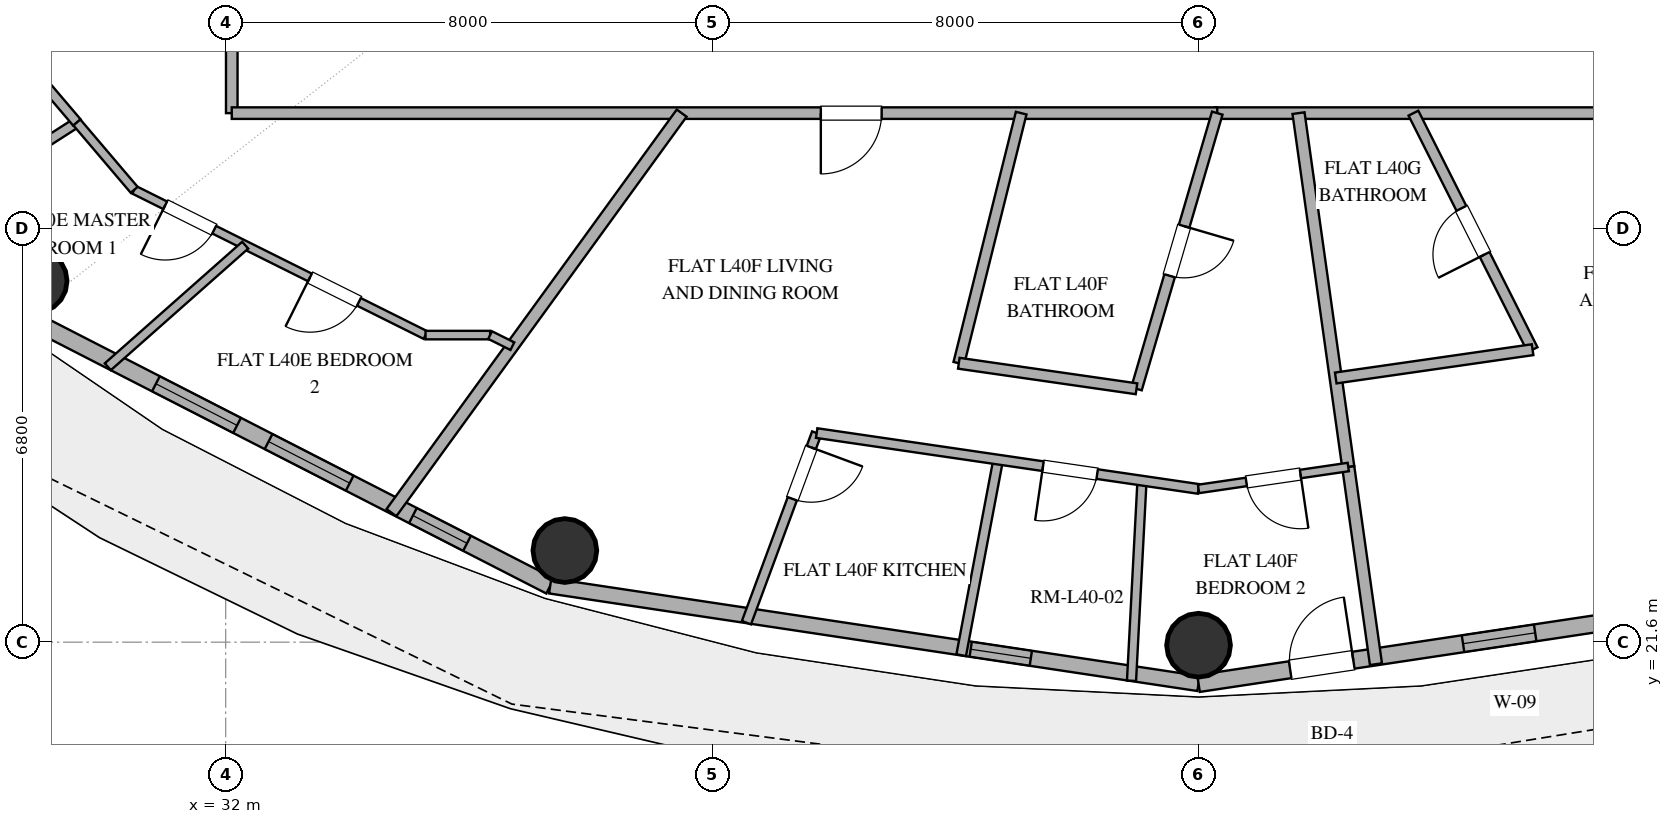
"""IFC4 building model, lengths in metres.
Left out: names, types, materials, properties, quantities, classifications, styles, units other than length and angle.
Written with IfcOpenShell. Run it as: python <this file> out.ifc"""

import sys

from ifc_helpers import new_model, si_unit, direction, frame, frame_2d, origin, origin_2d, place, context, subcontext, project, spatial, rectangle, hollow_circle, extrude, element, fill, save


model = new_model("IFC4")
c1 = context("Model", 3, precision=1e-05, world=origin(), true_north=direction((0.0, 1.0)))
c2 = subcontext(c1, "Body", "Model", "MODEL_VIEW")
j1 = project(units=[si_unit("LENGTHUNIT", "METRE"), si_unit("PLANEANGLEUNIT", "RADIAN")], contexts=[c1])
p1 = place(None, origin())
s1 = spatial("IfcSite", under=j1, at=p1, CompositionType="ELEMENT")
p2 = place(p1, origin())
s2 = spatial("IfcBuilding", under=s1, at=p2, CompositionType="ELEMENT")
p3 = place(p2, frame((0.0, 0.0, 161.4)))
s3 = spatial("IfcBuildingStorey", under=s2, at=p3, CompositionType="ELEMENT", Elevation=161.4)
for number, where, z_axis, x_axis in (
    (1, (28.866, 27.54, 0.0), (0.0, 0.0, 1.0), (1.0, 0.0, 0.0)),
    (2, (37.578, 23.107, 0.0), (0.0, 0.0, 1.0), (1.0, 0.0, 0.0)),
    (3, (48.0, 21.55, 0.0), (0.0, 0.0, 1.0), (1.0, 0.0, 0.0)),
):
    element("IfcColumn", number, at=place(p3, frame(where, z_axis=z_axis, x_axis=x_axis)), inside=s3, PredefinedType="COLUMN", context=c2, shape_type="SweptSolid", body=[
        extrude(hollow_circle(Radius=0.525, WallThickness=0.028, at=origin_2d()), origin(), (0.0, 0.0, 1.0), 3.38),
    ])
p4 = place(p3, frame((28.424, 27.094, 0.0), z_axis=(0.0, 0.0, 1.0), x_axis=(0.889872523182, -0.456209263919, 0.0)))
e4 = element("IfcWall", 4, at=p4, inside=s3, PredefinedType="SOLIDWALL", context=c2, shape_type="SweptSolid", body=[
    extrude(rectangle(XDim=10.016, YDim=0.28, at=frame_2d((5.008, 0.0))), origin(), (0.0, 0.0, 1.0), 3.38),
])
p5 = place(p4, frame((2.729, 0.0, 0.85)))
e5 = element("IfcOpeningElement", 5, at=p5, cuts=e4, PredefinedType="OPENING", context=c2, shape_type="SweptSolid", body=[
    extrude(rectangle(XDim=1.5, YDim=2.0, at=frame_2d((0.75, 1.0))), frame((0.0, 0.15, 0.0), z_axis=(0.0, -1.0, 0.0), x_axis=(1.0, 0.0, 0.0)), (0.0, 0.0, 1.0), 0.3),
])
p6 = place(p4, frame((4.811, 0.0, 0.85)))
e6 = element("IfcOpeningElement", 6, at=p6, cuts=e4, PredefinedType="OPENING", context=c2, shape_type="SweptSolid", body=[
    extrude(rectangle(XDim=1.5, YDim=2.0, at=frame_2d((0.75, 1.0))), frame((0.0, 0.15, 0.0), z_axis=(0.0, -1.0, 0.0), x_axis=(1.0, 0.0, 0.0)), (0.0, 0.0, 1.0), 0.3),
])
p7 = place(p4, frame((7.479, 0.0, 0.85)))
e7 = element("IfcOpeningElement", 7, at=p7, cuts=e4, PredefinedType="OPENING", context=c2, shape_type="SweptSolid", body=[
    extrude(rectangle(XDim=1.0, YDim=1.8, at=frame_2d((0.5, 0.9))), frame((0.0, 0.15, 0.0), z_axis=(0.0, -1.0, 0.0), x_axis=(1.0, 0.0, 0.0)), (0.0, 0.0, 1.0), 0.3),
])
p8 = place(p3, frame((37.337, 22.525, 0.0), z_axis=(0.0, 0.0, 1.0), x_axis=(0.988863993413, -0.148822049884, 0.0)))
e8 = element("IfcWall", 8, at=p8, inside=s3, PredefinedType="SOLIDWALL", context=c2, shape_type="SweptSolid", body=[
    extrude(rectangle(XDim=10.783, YDim=0.25, at=frame_2d((5.392, 0.0))), origin(), (0.0, 0.0, 1.0), 3.38),
])
p9 = place(p8, frame((6.993, 0.0, 0.35)))
e9 = element("IfcOpeningElement", 9, at=p9, cuts=e8, PredefinedType="OPENING", context=c2, shape_type="SweptSolid", body=[
    extrude(rectangle(XDim=1.0, YDim=1.05, at=frame_2d((0.5, 0.525))), frame((0.0, 0.135, 0.0), z_axis=(0.0, -1.0, 0.0), x_axis=(1.0, 0.0, 0.0)), (0.0, 0.0, 1.0), 0.27),
])
p10 = place(p3, frame((48.0, 20.92, 0.0), z_axis=(0.0, 0.0, 1.0), x_axis=(0.988863993413, 0.148822049884, 0.0)))
e10 = element("IfcWall", 10, at=p10, inside=s3, PredefinedType="SOLIDWALL", context=c2, shape_type="SweptSolid", body=[
    extrude(rectangle(XDim=10.783, YDim=0.28, at=frame_2d((5.392, 0.0))), origin(), (0.0, 0.0, 1.0), 3.38),
])
p11 = place(p10, frame((1.524, 0.0, 0.0)))
e11 = element("IfcOpeningElement", 11, at=p11, cuts=e10, PredefinedType="OPENING", context=c2, shape_type="SweptSolid", body=[
    extrude(rectangle(XDim=1.05, YDim=2.2, at=frame_2d((0.525, 1.1))), frame((0.0, 0.15, 0.0), z_axis=(0.0, -1.0, 0.0), x_axis=(1.0, 0.0, 0.0)), (0.0, 0.0, 1.0), 0.3),
])
p12 = place(p10, frame((4.399, 0.0, 0.85)))
e12 = element("IfcOpeningElement", 12, at=p12, cuts=e10, PredefinedType="OPENING", context=c2, shape_type="SweptSolid", body=[
    extrude(rectangle(XDim=1.2, YDim=1.8, at=frame_2d((0.6, 0.9))), frame((0.0, 0.15, 0.0), z_axis=(0.0, -1.0, 0.0), x_axis=(1.0, 0.0, 0.0)), (0.0, 0.0, 1.0), 0.3),
])
p13 = place(p10, frame((6.815, 0.0, 0.85)))
e13 = element("IfcOpeningElement", 13, at=p13, cuts=e10, PredefinedType="OPENING", context=c2, shape_type="SweptSolid", body=[
    extrude(rectangle(XDim=1.2, YDim=1.8, at=frame_2d((0.6, 0.9))), frame((0.0, 0.15, 0.0), z_axis=(0.0, -1.0, 0.0), x_axis=(1.0, 0.0, 0.0)), (0.0, 0.0, 1.0), 0.3),
])
p14 = place(p3, frame((63.9, 30.3, 0.0), z_axis=(0.0, 0.0, 1.0), x_axis=(-1.0, 0.0, 0.0)))
e14 = element("IfcWall", 14, at=p14, inside=s3, PredefinedType="PARTITIONING", context=c2, shape_type="SweptSolid", body=[
    extrude(rectangle(XDim=15.625, YDim=0.19, at=frame_2d((7.813, 0.0))), origin(), (0.0, 0.0, 1.0), 2.74),
])
p15 = place(p14, frame((6.137, 0.0, 0.0)))
e15 = element("IfcOpeningElement", 15, at=p15, cuts=e14, PredefinedType="OPENING", context=c2, shape_type="SweptSolid", body=[
    extrude(rectangle(XDim=1.0, YDim=2.2, at=frame_2d((0.5, 1.1))), frame((0.0, 0.105, 0.0), z_axis=(0.0, -1.0, 0.0), x_axis=(1.0, 0.0, 0.0)), (0.0, 0.0, 1.0), 0.21),
])
p16 = place(p3, frame((32.1, 30.3, 0.0), z_axis=(0.0, 0.0, 1.0), x_axis=(0.0, 1.0, 0.0)))
e16 = element("IfcWall", 16, at=p16, inside=s3, PredefinedType="PARTITIONING", context=c2, shape_type="SweptSolid", body=[
    extrude(rectangle(XDim=10.62, YDim=0.19, at=frame_2d((5.31, 0.0))), origin(), (0.0, 0.0, 1.0), 2.74),
])
p17 = place(p16, frame((3.475, 0.0, 0.0)))
e17 = element("IfcOpeningElement", 17, at=p17, cuts=e16, PredefinedType="OPENING", context=c2, shape_type="SweptSolid", body=[
    extrude(rectangle(XDim=1.0, YDim=2.2, at=frame_2d((0.5, 1.1))), frame((0.0, 0.105, 0.0), z_axis=(0.0, -1.0, 0.0), x_axis=(1.0, 0.0, 0.0)), (0.0, 0.0, 1.0), 0.21),
])
p18 = place(p3, frame((48.308, 30.3, 0.0), z_axis=(0.0, 0.0, 1.0), x_axis=(-1.0, 0.0, 0.0)))
e18 = element("IfcWall", 18, at=p18, inside=s3, PredefinedType="PARTITIONING", context=c2, shape_type="SweptSolid", body=[
    extrude(rectangle(XDim=16.208, YDim=0.19, at=frame_2d((8.104, 0.0))), origin(), (0.0, 0.0, 1.0), 2.74),
])
p19 = place(p18, frame((5.52, 0.0, 0.0)))
e19 = element("IfcOpeningElement", 19, at=p19, cuts=e18, PredefinedType="OPENING", context=c2, shape_type="SweptSolid", body=[
    extrude(rectangle(XDim=1.0, YDim=2.2, at=frame_2d((0.5, 1.1))), frame((0.0, 0.105, 0.0), z_axis=(0.0, -1.0, 0.0), x_axis=(1.0, 0.0, 0.0)), (0.0, 0.0, 1.0), 0.21),
])
p20 = place(p3, frame((34.726, 23.73, 0.0), z_axis=(0.0, 0.0, 1.0), x_axis=(0.587785528328, 0.809016793823, 0.0)))
e20 = element("IfcWall", 20, at=p20, inside=s3, PredefinedType="PARTITIONING", context=c2, shape_type="SweptSolid", body=[
    extrude(rectangle(XDim=8.121, YDim=0.2, at=frame_2d((4.061, 0.0))), origin(), (0.0, 0.0, 1.0), 2.74),
])
p21 = place(p3, frame((48.308, 30.3, 0.0), z_axis=(0.0, 0.0, 1.0), x_axis=(-0.281192482413, -0.9596513887, 0.0)))
e21 = element("IfcWall", 21, at=p21, inside=s3, PredefinedType="PLUMBINGWALL", context=c2, shape_type="SweptSolid", body=[
    extrude(rectangle(XDim=4.724, YDim=0.18, at=frame_2d((2.362, 0.0))), origin(), (0.0, 0.0, 1.0), 2.74),
])
p22 = place(p21, frame((1.937, 0.0, 0.0)))
e22 = element("IfcOpeningElement", 22, at=p22, cuts=e21, PredefinedType="OPENING", context=c2, shape_type="SweptSolid", body=[
    extrude(rectangle(XDim=0.85, YDim=2.1, at=frame_2d((0.425, 1.05))), frame((0.0, 0.1, 0.0), z_axis=(0.0, -1.0, 0.0), x_axis=(1.0, 0.0, 0.0)), (0.0, 0.0, 1.0), 0.2),
])
p23 = place(p3, frame((49.644, 30.3, 0.0), z_axis=(0.0, 0.0, 1.0), x_axis=(0.139158723068, -0.990270089316, 0.0)))
e23 = element("IfcWall", 23, at=p23, inside=s3, PredefinedType="PARTITIONING", context=c2, shape_type="SweptSolid", body=[
    extrude(rectangle(XDim=5.877, YDim=0.2, at=frame_2d((2.938, 0.0))), origin(), (0.0, 0.0, 1.0), 2.74),
])
p24 = place(p3, frame((53.494, 26.41, 0.0), z_axis=(0.0, 0.0, 1.0), x_axis=(-0.449879384809, 0.89308932315, 0.0)))
e24 = element("IfcWall", 24, at=p24, inside=s3, PredefinedType="PLUMBINGWALL", context=c2, shape_type="SweptSolid", body=[
    extrude(rectangle(XDim=4.356, YDim=0.18, at=frame_2d((2.178, 0.0))), origin(), (0.0, 0.0, 1.0), 2.74),
])
p25 = place(p24, frame((1.753, 0.0, 0.0)))
e25 = element("IfcOpeningElement", 25, at=p25, cuts=e24, PredefinedType="OPENING", context=c2, shape_type="SweptSolid", body=[
    extrude(rectangle(XDim=0.85, YDim=2.1, at=frame_2d((0.425, 1.05))), frame((0.0, 0.1, 0.0), z_axis=(0.0, -1.0, 0.0), x_axis=(1.0, 0.0, 0.0)), (0.0, 0.0, 1.0), 0.2),
])
p26 = place(p3, frame((44.057, 26.187, 0.0), z_axis=(0.0, 0.0, 1.0), x_axis=(0.241939344098, 0.97029137571, 0.0)))
e26 = element("IfcWall", 26, at=p26, inside=s3, PredefinedType="PLUMBINGWALL", context=c2, shape_type="SweptSolid", body=[
    extrude(rectangle(XDim=4.239, YDim=0.18, at=frame_2d((2.12, 0.0))), origin(), (0.0, 0.0, 1.0), 2.74),
])
p27 = place(p3, frame((35.287, 26.65, 0.0), z_axis=(0.0, 0.0, 1.0), x_axis=(-0.894937323042, 0.44619187333, 0.0)))
e27 = element("IfcWall", 27, at=p27, inside=s3, PredefinedType="PARTITIONING", context=c2, shape_type="SweptSolid", body=[
    extrude(rectangle(XDim=5.354, YDim=0.14, at=frame_2d((2.677, 0.0))), origin(), (0.0, 0.0, 1.0), 2.74),
])
p28 = place(p27, frame((1.224, 0.0, 0.0)))
e28 = element("IfcOpeningElement", 28, at=p28, cuts=e27, PredefinedType="OPENING", context=c2, shape_type="SweptSolid", body=[
    extrude(rectangle(XDim=0.9, YDim=2.1, at=frame_2d((0.45, 1.05))), frame((0.0, 0.08, 0.0), z_axis=(0.0, -1.0, 0.0), x_axis=(1.0, 0.0, 0.0)), (0.0, 0.0, 1.0), 0.16),
])
p29 = place(p27, frame((3.884, 0.0, 0.0)))
e29 = element("IfcOpeningElement", 29, at=p29, cuts=e27, PredefinedType="OPENING", context=c2, shape_type="SweptSolid", body=[
    extrude(rectangle(XDim=0.9, YDim=2.1, at=frame_2d((0.45, 1.05))), frame((0.0, 0.08, 0.0), z_axis=(0.0, -1.0, 0.0), x_axis=(1.0, 0.0, 0.0)), (0.0, 0.0, 1.0), 0.16),
])
p30 = place(p3, frame((41.719, 25.039, 0.0), z_axis=(0.0, 0.0, 1.0), x_axis=(-0.347266531909, -0.937766471898, 0.0)))
e30 = element("IfcWall", 30, at=p30, inside=s3, PredefinedType="PLUMBINGWALL", context=c2, shape_type="SweptSolid", body=[
    extrude(rectangle(XDim=3.325, YDim=0.16, at=frame_2d((1.663, 0.0))), origin(), (0.0, 0.0, 1.0), 2.74),
])
p31 = place(p30, frame((0.253, 0.0, 0.0)))
e31 = element("IfcOpeningElement", 31, at=p31, cuts=e30, PredefinedType="OPENING", context=c2, shape_type="SweptSolid", body=[
    extrude(rectangle(XDim=0.9, YDim=2.1, at=frame_2d((0.45, 1.05))), frame((0.0, 0.09, 0.0), z_axis=(0.0, -1.0, 0.0), x_axis=(1.0, 0.0, 0.0)), (0.0, 0.0, 1.0), 0.18),
])
p32 = place(p3, frame((46.898, 20.965, 0.0), z_axis=(0.0, 0.0, 1.0), x_axis=(0.052302203263, 0.998631303101, 0.0)))
e32 = element("IfcWall", 32, at=p32, inside=s3, PredefinedType="PARTITIONING", context=c2, shape_type="SweptSolid", body=[
    extrude(rectangle(XDim=3.295, YDim=0.15, at=frame_2d((1.648, 0.0))), origin(), (0.0, 0.0, 1.0), 2.74),
])
p33 = place(p3, frame((50.462, 24.48, 0.0), z_axis=(0.0, 0.0, 1.0), x_axis=(0.139145146576, -0.990271997072, 0.0)))
e33 = element("IfcWall", 33, at=p33, inside=s3, PredefinedType="PARTITIONING", context=c2, shape_type="SweptSolid", body=[
    extrude(rectangle(XDim=3.274, YDim=0.2, at=frame_2d((1.637, 0.0))), origin(), (0.0, 0.0, 1.0), 2.74),
])
p34 = place(p3, frame((44.096, 21.386, 0.0), z_axis=(0.0, 0.0, 1.0), x_axis=(0.186049333211, 0.982540404061, 0.0)))
e34 = element("IfcWall", 34, at=p34, inside=s3, PredefinedType="PLUMBINGWALL", context=c2, shape_type="SweptSolid", body=[
    extrude(rectangle(XDim=3.273, YDim=0.16, at=frame_2d((1.636, 0.0))), origin(), (0.0, 0.0, 1.0), 2.74),
])
p35 = place(p3, frame((50.257, 25.944, 0.0), z_axis=(0.0, 0.0, 1.0), x_axis=(0.989826700743, 0.142278257286, 0.0)))
e35 = element("IfcWall", 35, at=p35, inside=s3, PredefinedType="PLUMBINGWALL", context=c2, shape_type="SweptSolid", body=[
    extrude(rectangle(XDim=3.271, YDim=0.18, at=frame_2d((1.635, 0.0))), origin(), (0.0, 0.0, 1.0), 2.74),
])
p36 = place(p3, frame((48.0, 24.12, 0.0), z_axis=(0.0, 0.0, 1.0), x_axis=(-0.989475575411, 0.144699985022, 0.0)))
e36 = element("IfcWall", 36, at=p36, inside=s3, PredefinedType="PLUMBINGWALL", context=c2, shape_type="SweptSolid", body=[
    extrude(rectangle(XDim=6.347, YDim=0.16, at=frame_2d((3.174, 0.0))), origin(), (0.0, 0.0, 1.0), 2.74),
])
p37 = place(p36, frame((1.685, 0.0, 0.0)))
e37 = element("IfcOpeningElement", 37, at=p37, cuts=e36, PredefinedType="OPENING", context=c2, shape_type="SweptSolid", body=[
    extrude(rectangle(XDim=0.9, YDim=2.1, at=frame_2d((0.45, 1.05))), frame((0.0, 0.09, 0.0), z_axis=(0.0, -1.0, 0.0), x_axis=(1.0, 0.0, 0.0)), (0.0, 0.0, 1.0), 0.18),
])
p38 = place(p3, frame((32.321, 28.128, 0.0), z_axis=(0.0, 0.0, 1.0), x_axis=(-0.748956405403, -0.6626192744, 0.0)))
e38 = element("IfcWall", 38, at=p38, inside=s3, PredefinedType="PARTITIONING", context=c2, shape_type="SweptSolid", body=[
    extrude(rectangle(XDim=3.017, YDim=0.15, at=frame_2d((1.509, 0.0))), origin(), (0.0, 0.0, 1.0), 2.74),
])
p39 = place(p3, frame((29.553, 30.146, 0.0), z_axis=(0.0, 0.0, 1.0), x_axis=(-0.841296531109, -0.540573904978, 0.0)))
e39 = element("IfcWall", 39, at=p39, inside=s3, PredefinedType="PLUMBINGWALL", context=c2, shape_type="SweptSolid", body=[
    extrude(rectangle(XDim=2.956, YDim=0.16, at=frame_2d((1.478, 0.0))), origin(), (0.0, 0.0, 1.0), 2.74),
])
p40 = place(p3, frame((46.979, 25.767, 0.0), z_axis=(0.0, 0.0, 1.0), x_axis=(-0.989820071869, 0.142324366588, 0.0)))
e40 = element("IfcWall", 40, at=p40, inside=s3, PredefinedType="PLUMBINGWALL", context=c2, shape_type="SweptSolid", body=[
    extrude(rectangle(XDim=2.952, YDim=0.18, at=frame_2d((1.476, 0.0))), origin(), (0.0, 0.0, 1.0), 2.74),
])
p41 = place(p3, frame((50.462, 24.48, 0.0), z_axis=(0.0, 0.0, 1.0), x_axis=(-0.989489157172, -0.144607080872, 0.0)))
e41 = element("IfcWall", 41, at=p41, inside=s3, PredefinedType="PARTITIONING", context=c2, shape_type="SweptSolid", body=[
    extrude(rectangle(XDim=2.489, YDim=0.14, at=frame_2d((1.244, 0.0))), origin(), (0.0, 0.0, 1.0), 2.74),
])
p42 = place(p41, frame((0.794, 0.0, 0.0)))
e42 = element("IfcOpeningElement", 42, at=p42, cuts=e41, PredefinedType="OPENING", context=c2, shape_type="SweptSolid", body=[
    extrude(rectangle(XDim=0.9, YDim=2.1, at=frame_2d((0.45, 1.05))), frame((0.0, 0.08, 0.0), z_axis=(0.0, -1.0, 0.0), x_axis=(1.0, 0.0, 0.0)), (0.0, 0.0, 1.0), 0.16),
])
p43 = place(p3, frame((28.45, 31.443, 0.0), z_axis=(0.0, 0.0, 1.0), x_axis=(0.64788149294, -0.761741144422, 0.0)))
e43 = element("IfcWall", 43, at=p43, inside=s3, PredefinedType="PLUMBINGWALL", context=c2, shape_type="SweptSolid", body=[
    extrude(rectangle(XDim=1.702, YDim=0.16, at=frame_2d((0.851, 0.0))), origin(), (0.0, 0.0, 1.0), 2.74),
])
p44 = place(p3, frame((29.553, 30.146, 0.0), z_axis=(0.0, 0.0, 1.0), x_axis=(0.647896934681, -0.761728010533, 0.0)))
e44 = element("IfcWall", 44, at=p44, inside=s3, PredefinedType="PARTITIONING", context=c2, shape_type="SweptSolid", body=[
    extrude(rectangle(XDim=1.454, YDim=0.15, at=frame_2d((0.727, 0.0))), origin(), (0.0, 0.0, 1.0), 2.74),
])
p45 = place(p3, frame((36.349, 26.65, 0.0), z_axis=(0.0, 0.0, 1.0), x_axis=(-1.0, 0.0, 0.0)))
e45 = element("IfcWall", 45, at=p45, inside=s3, PredefinedType="PARTITIONING", context=c2, shape_type="SweptSolid", body=[
    extrude(rectangle(XDim=1.062, YDim=0.14, at=frame_2d((0.531, 0.0))), origin(), (0.0, 0.0, 1.0), 2.74),
])
p46 = place(p3, frame((36.715, 26.468, 0.0), z_axis=(0.0, 0.0, 1.0), x_axis=(-0.895142158028, 0.445780794698, 0.0)))
e46 = element("IfcWall", 46, at=p46, inside=s3, PredefinedType="PARTITIONING", context=c2, shape_type="SweptSolid", body=[
    extrude(rectangle(XDim=0.409, YDim=0.14, at=frame_2d((0.205, 0.0))), origin(), (0.0, 0.0, 1.0), 2.74),
])
p47 = place(p5, origin())
e47 = element("IfcWindow", 47, at=p47, inside=s3, PartitioningType="SINGLE_PANEL", PredefinedType="WINDOW", context=c2, shape_type="SweptSolid", body=[
    extrude(rectangle(XDim=1.5, YDim=2.0, at=frame_2d((0.75, 1.0))), frame((0.0, 0.03, 0.0), z_axis=(0.0, -1.0, 0.0), x_axis=(1.0, 0.0, 0.0)), (0.0, 0.0, 1.0), 0.06),
])
fill(e5, e47)
p48 = place(p6, origin())
e48 = element("IfcWindow", 48, at=p48, inside=s3, PartitioningType="SINGLE_PANEL", PredefinedType="WINDOW", context=c2, shape_type="SweptSolid", body=[
    extrude(rectangle(XDim=1.5, YDim=2.0, at=frame_2d((0.75, 1.0))), frame((0.0, 0.03, 0.0), z_axis=(0.0, -1.0, 0.0), x_axis=(1.0, 0.0, 0.0)), (0.0, 0.0, 1.0), 0.06),
])
fill(e6, e48)
p49 = place(p7, origin())
e49 = element("IfcWindow", 49, at=p49, inside=s3, PartitioningType="SINGLE_PANEL", PredefinedType="WINDOW", context=c2, shape_type="SweptSolid", body=[
    extrude(rectangle(XDim=1.0, YDim=1.8, at=frame_2d((0.5, 0.9))), frame((0.0, 0.03, 0.0), z_axis=(0.0, -1.0, 0.0), x_axis=(1.0, 0.0, 0.0)), (0.0, 0.0, 1.0), 0.06),
])
fill(e7, e49)
p50 = place(p11, origin())
e50 = element("IfcDoor", 50, at=p50, inside=s3, OperationType="SINGLE_SWING_RIGHT", PredefinedType="DOOR", context=c2, shape_type="SweptSolid", body=[
    extrude(rectangle(XDim=1.05, YDim=2.2, at=frame_2d((0.525, 1.1))), frame((0.0, 0.025, 0.0), z_axis=(0.0, -1.0, 0.0), x_axis=(1.0, 0.0, 0.0)), (0.0, 0.0, 1.0), 0.05),
])
fill(e11, e50)
p51 = place(p12, origin())
e51 = element("IfcWindow", 51, at=p51, inside=s3, PartitioningType="SINGLE_PANEL", PredefinedType="WINDOW", context=c2, shape_type="SweptSolid", body=[
    extrude(rectangle(XDim=1.2, YDim=1.8, at=frame_2d((0.6, 0.9))), frame((0.0, 0.03, 0.0), z_axis=(0.0, -1.0, 0.0), x_axis=(1.0, 0.0, 0.0)), (0.0, 0.0, 1.0), 0.06),
])
fill(e12, e51)
p52 = place(p9, origin())
e52 = element("IfcWindow", 52, at=p52, inside=s3, PartitioningType="SINGLE_PANEL", PredefinedType="WINDOW", context=c2, shape_type="SweptSolid", body=[
    extrude(rectangle(XDim=1.0, YDim=1.05, at=frame_2d((0.5, 0.525))), frame((0.0, 0.03, 0.0), z_axis=(0.0, -1.0, 0.0), x_axis=(1.0, 0.0, 0.0)), (0.0, 0.0, 1.0), 0.06),
])
fill(e9, e52)
p53 = place(p19, origin())
e53 = element("IfcDoor", 53, at=p53, inside=s3, OperationType="SINGLE_SWING_RIGHT", PredefinedType="DOOR", context=c2, shape_type="SweptSolid", body=[
    extrude(rectangle(XDim=1.0, YDim=2.2, at=frame_2d((0.5, 1.1))), frame((0.0, 0.025, 0.0), z_axis=(0.0, -1.0, 0.0), x_axis=(1.0, 0.0, 0.0)), (0.0, 0.0, 1.0), 0.05),
])
fill(e19, e53)
p54 = place(p22, origin())
e54 = element("IfcDoor", 54, at=p54, inside=s3, OperationType="SINGLE_SWING_LEFT", PredefinedType="DOOR", context=c2, shape_type="SweptSolid", body=[
    extrude(rectangle(XDim=0.85, YDim=2.1, at=frame_2d((0.425, 1.05))), frame((0.0, 0.025, 0.0), z_axis=(0.0, -1.0, 0.0), x_axis=(1.0, 0.0, 0.0)), (0.0, 0.0, 1.0), 0.05),
])
fill(e22, e54)
p55 = place(p25, origin())
e55 = element("IfcDoor", 55, at=p55, inside=s3, OperationType="SINGLE_SWING_LEFT", PredefinedType="DOOR", context=c2, shape_type="SweptSolid", body=[
    extrude(rectangle(XDim=0.85, YDim=2.1, at=frame_2d((0.425, 1.05))), frame((0.0, 0.025, 0.0), z_axis=(0.0, -1.0, 0.0), x_axis=(1.0, 0.0, 0.0)), (0.0, 0.0, 1.0), 0.05),
])
fill(e25, e55)
p56 = place(p28, origin())
e56 = element("IfcDoor", 56, at=p56, inside=s3, OperationType="SINGLE_SWING_RIGHT", PredefinedType="DOOR", context=c2, shape_type="SweptSolid", body=[
    extrude(rectangle(XDim=0.9, YDim=2.1, at=frame_2d((0.45, 1.05))), frame((0.0, 0.025, 0.0), z_axis=(0.0, -1.0, 0.0), x_axis=(1.0, 0.0, 0.0)), (0.0, 0.0, 1.0), 0.05),
])
fill(e28, e56)
p57 = place(p29, origin())
e57 = element("IfcDoor", 57, at=p57, inside=s3, OperationType="SINGLE_SWING_RIGHT", PredefinedType="DOOR", context=c2, shape_type="SweptSolid", body=[
    extrude(rectangle(XDim=0.9, YDim=2.1, at=frame_2d((0.45, 1.05))), frame((0.0, 0.025, 0.0), z_axis=(0.0, -1.0, 0.0), x_axis=(1.0, 0.0, 0.0)), (0.0, 0.0, 1.0), 0.05),
])
fill(e29, e57)
p58 = place(p31, origin())
e58 = element("IfcDoor", 58, at=p58, inside=s3, OperationType="SINGLE_SWING_LEFT", PredefinedType="DOOR", context=c2, shape_type="SweptSolid", body=[
    extrude(rectangle(XDim=0.9, YDim=2.1, at=frame_2d((0.45, 1.05))), frame((0.0, 0.025, 0.0), z_axis=(0.0, -1.0, 0.0), x_axis=(1.0, 0.0, 0.0)), (0.0, 0.0, 1.0), 0.05),
])
fill(e31, e58)
p59 = place(p37, origin())
e59 = element("IfcDoor", 59, at=p59, inside=s3, OperationType="SINGLE_SWING_RIGHT", PredefinedType="DOOR", context=c2, shape_type="SweptSolid", body=[
    extrude(rectangle(XDim=0.9, YDim=2.1, at=frame_2d((0.45, 1.05))), frame((0.0, 0.025, 0.0), z_axis=(0.0, -1.0, 0.0), x_axis=(1.0, 0.0, 0.0)), (0.0, 0.0, 1.0), 0.05),
])
fill(e37, e59)
p60 = place(p42, origin())
e60 = element("IfcDoor", 60, at=p60, inside=s3, OperationType="SINGLE_SWING_LEFT", PredefinedType="DOOR", context=c2, shape_type="SweptSolid", body=[
    extrude(rectangle(XDim=0.9, YDim=2.1, at=frame_2d((0.45, 1.05))), frame((0.0, 0.025, 0.0), z_axis=(0.0, -1.0, 0.0), x_axis=(1.0, 0.0, 0.0)), (0.0, 0.0, 1.0), 0.05),
])
fill(e42, e60)
save(model, sys.argv[1])
